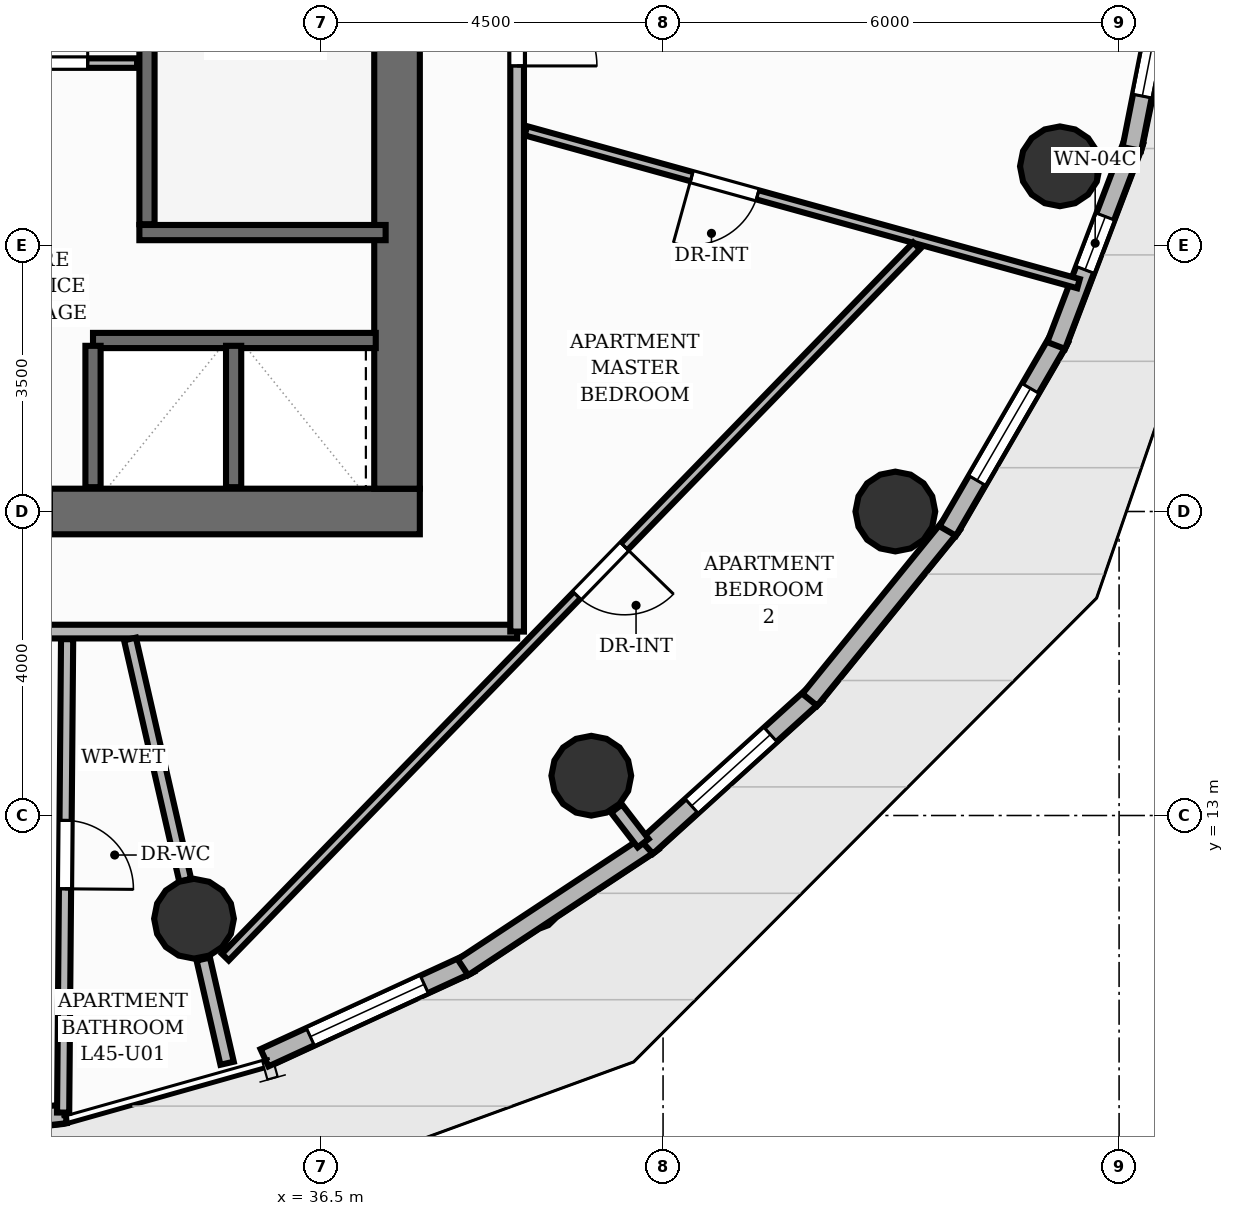
"""IFC4 building model, lengths in metres.
Left out: names, types, materials, properties, quantities, classifications, styles, units other than length and angle.
Written with IfcOpenShell. Run it as: python <this file> out.ifc"""

import sys

from ifc_helpers import new_model, si_unit, direction, frame, frame_2d, origin, origin_2d, place, context, subcontext, project, spatial, rectangle, circle, extrude, element, fill, save


model = new_model("IFC4")
c1 = context("Model", 3, precision=1e-05, world=origin(), true_north=direction((0.0, 1.0)))
c2 = subcontext(c1, "Body", "Model", "MODEL_VIEW")
j1 = project(units=[si_unit("LENGTHUNIT", "METRE"), si_unit("PLANEANGLEUNIT", "RADIAN")], contexts=[c1])
p1 = place(None, origin())
s1 = spatial("IfcSite", under=j1, at=p1, CompositionType="ELEMENT")
p2 = place(p1, origin())
s2 = spatial("IfcBuilding", under=s1, at=p2, CompositionType="ELEMENT")
p3 = place(p2, frame((0.0, 0.0, 152.16)))
s3 = spatial("IfcBuildingStorey", under=s2, at=p3, CompositionType="ELEMENT", Elevation=152.16)
p4 = place(p3, frame((22.7, 17.0, 0.0), z_axis=(0.0, 0.0, 1.0), x_axis=(1.0, 0.0, 0.0)))
e1 = element("IfcWall", 1, at=p4, inside=s3, PredefinedType="SHEAR", context=c2, shape_type="SweptSolid", body=[
    extrude(rectangle(XDim=15.1, YDim=0.6, at=frame_2d((7.55, 0.0))), origin(), (0.0, 0.0, 1.0), 3.2),
])
p5 = place(p4, frame((5.8, 0.0, 0.0)))
e2 = element("IfcOpeningElement", 2, at=p5, cuts=e1, PredefinedType="OPENING", context=c2, shape_type="SweptSolid", body=[
    extrude(rectangle(XDim=1.1, YDim=2.15, at=frame_2d((0.55, 1.075))), frame((0.0, 0.31, 0.0), z_axis=(0.0, -1.0, 0.0), x_axis=(1.0, 0.0, 0.0)), (0.0, 0.0, 1.0), 0.62),
])
p6 = place(p4, frame((9.35, 0.0, 0.0)))
e3 = element("IfcOpeningElement", 3, at=p6, cuts=e1, PredefinedType="OPENING", context=c2, shape_type="SweptSolid", body=[
    extrude(rectangle(XDim=0.9, YDim=2.1, at=frame_2d((0.45, 1.05))), frame((0.0, 0.31, 0.0), z_axis=(0.0, -1.0, 0.0), x_axis=(1.0, 0.0, 0.0)), (0.0, 0.0, 1.0), 0.62),
])
p7 = place(p3, frame((37.5, 17.3, 0.0), z_axis=(0.0, 0.0, 1.0), x_axis=(0.0, 1.0, 0.0)))
e4 = element("IfcWall", 4, at=p7, inside=s3, PredefinedType="SHEAR", context=c2, shape_type="SweptSolid", body=[
    extrude(rectangle(XDim=13.4, YDim=0.6, at=frame_2d((6.7, 0.0))), origin(), (0.0, 0.0, 1.0), 3.2),
])
for number, where, z_axis, x_axis in (
    (5, (34.829, 11.642, 0.0), (0.0, 0.0, 1.0), (1.0, 0.0, 0.0)),
    (6, (40.056, 13.523, 0.0), (0.0, 0.0, 1.0), (1.0, 0.0, 0.0)),
    (7, (44.056, 17.0, 0.0), (0.0, 0.0, 1.0), (1.0, 0.0, 0.0)),
    (8, (46.221, 21.542, 0.0), (0.0, 0.0, 1.0), (1.0, 0.0, 0.0)),
):
    element("IfcColumn", number, at=place(p3, frame(where, z_axis=z_axis, x_axis=x_axis)), inside=s3, PredefinedType="COLUMN", context=c2, shape_type="SweptSolid", body=[
        extrude(circle(Radius=0.525, at=origin_2d()), origin(), (0.0, 0.0, 1.0), 3.2),
    ])
p8 = place(p3, frame((33.14, 9.076, 0.0), z_axis=(0.0, 0.0, 1.0), x_axis=(-0.993631150985, -0.112681568111, 0.0)))
e9 = element("IfcWall", 9, at=p8, inside=s3, PredefinedType="SOLIDWALL", context=c2, shape_type="SweptSolid", body=[
    extrude(rectangle(XDim=2.882, YDim=0.25, at=frame_2d((1.441, 0.0))), origin(), (0.0, 0.0, 1.0), 2.96),
])
p9 = place(p8, frame((0.866, 0.0, 0.0)))
e10 = element("IfcOpeningElement", 10, at=p9, cuts=e9, PredefinedType="OPENING", context=c2, shape_type="SweptSolid", body=[
    extrude(rectangle(XDim=1.15, YDim=2.2, at=frame_2d((0.575, 1.1))), frame((0.0, 0.135, 0.0), z_axis=(0.0, -1.0, 0.0), x_axis=(1.0, 0.0, 0.0)), (0.0, 0.0, 1.0), 0.27),
])
p10 = place(p3, frame((38.461, 11.056, 0.0), z_axis=(0.0, 0.0, 1.0), x_axis=(-0.908594420046, -0.417679518124, 0.0)))
e11 = element("IfcWall", 11, at=p10, inside=s3, PredefinedType="SOLIDWALL", context=c2, shape_type="SweptSolid", body=[
    extrude(rectangle(XDim=2.977, YDim=0.25, at=frame_2d((1.489, 0.0))), origin(), (0.0, 0.0, 1.0), 2.96),
])
p11 = place(p10, frame((0.664, 0.0, 0.85)))
e12 = element("IfcOpeningElement", 12, at=p11, cuts=e11, PredefinedType="OPENING", context=c2, shape_type="SweptSolid", body=[
    extrude(rectangle(XDim=1.65, YDim=1.55, at=frame_2d((0.825, 0.775))), frame((0.0, 0.135, 0.0), z_axis=(0.0, -1.0, 0.0), x_axis=(1.0, 0.0, 0.0)), (0.0, 0.0, 1.0), 0.27),
])
p12 = place(p3, frame((40.868, 12.656, 0.0), z_axis=(0.0, 0.0, 1.0), x_axis=(-0.83436073477, -0.551218798912, 0.0)))
e13 = element("IfcWall", 13, at=p12, inside=s3, PredefinedType="SOLIDWALL", context=c2, shape_type="SweptSolid", body=[
    extrude(rectangle(XDim=2.998, YDim=0.25, at=frame_2d((1.499, 0.0))), origin(), (0.0, 0.0, 1.0), 2.96),
])
p13 = place(p3, frame((43.005, 14.602, 0.0), z_axis=(0.0, 0.0, 1.0), x_axis=(-0.741367932595, -0.671098791922, 0.0)))
e14 = element("IfcWall", 14, at=p13, inside=s3, PredefinedType="SOLIDWALL", context=c2, shape_type="SweptSolid", body=[
    extrude(rectangle(XDim=2.998, YDim=0.25, at=frame_2d((1.499, 0.0))), origin(), (0.0, 0.0, 1.0), 2.96),
])
p14 = place(p13, frame((0.799, 0.0, 0.85)))
e15 = element("IfcOpeningElement", 15, at=p14, cuts=e14, PredefinedType="OPENING", context=c2, shape_type="SweptSolid", body=[
    extrude(rectangle(XDim=1.4, YDim=1.55, at=frame_2d((0.7, 0.775))), frame((0.0, 0.135, 0.0), z_axis=(0.0, -1.0, 0.0), x_axis=(1.0, 0.0, 0.0)), (0.0, 0.0, 1.0), 0.27),
])
p15 = place(p3, frame((44.807, 16.833, 0.0), z_axis=(0.0, 0.0, 1.0), x_axis=(-0.630478385784, -0.776206805599, 0.0)))
e16 = element("IfcWall", 16, at=p15, inside=s3, PredefinedType="SOLIDWALL", context=c2, shape_type="SweptSolid", body=[
    extrude(rectangle(XDim=2.977, YDim=0.25, at=frame_2d((1.489, 0.0))), origin(), (0.0, 0.0, 1.0), 2.96),
])
p16 = place(p3, frame((46.219, 19.283, 0.0), z_axis=(0.0, 0.0, 1.0), x_axis=(-0.502009170613, -0.864862296912, 0.0)))
e17 = element("IfcWall", 17, at=p16, inside=s3, PredefinedType="SOLIDWALL", context=c2, shape_type="SweptSolid", body=[
    extrude(rectangle(XDim=2.937, YDim=0.25, at=frame_2d((1.469, 0.0))), origin(), (0.0, 0.0, 1.0), 2.96),
])
p17 = place(p16, frame((0.768, 0.0, 0.85)))
e18 = element("IfcOpeningElement", 18, at=p17, cuts=e17, PredefinedType="OPENING", context=c2, shape_type="SweptSolid", body=[
    extrude(rectangle(XDim=1.4, YDim=1.55, at=frame_2d((0.7, 0.775))), frame((0.0, 0.135, 0.0), z_axis=(0.0, -1.0, 0.0), x_axis=(1.0, 0.0, 0.0)), (0.0, 0.0, 1.0), 0.27),
])
p18 = place(p3, frame((47.198, 21.877, 0.0), z_axis=(0.0, 0.0, 1.0), x_axis=(-0.356178525313, -0.934417924756, 0.0)))
e19 = element("IfcWall", 19, at=p18, inside=s3, PredefinedType="SOLIDWALL", context=c2, shape_type="SweptSolid", body=[
    extrude(rectangle(XDim=2.882, YDim=0.25, at=frame_2d((1.441, 0.0))), origin(), (0.0, 0.0, 1.0), 2.96),
])
p19 = place(p18, frame((1.066, 0.0, 0.85)))
e20 = element("IfcOpeningElement", 20, at=p19, cuts=e19, PredefinedType="OPENING", context=c2, shape_type="SweptSolid", body=[
    extrude(rectangle(XDim=0.75, YDim=1.55, at=frame_2d((0.375, 0.775))), frame((0.0, 0.135, 0.0), z_axis=(0.0, -1.0, 0.0), x_axis=(1.0, 0.0, 0.0)), (0.0, 0.0, 1.0), 0.27),
])
p20 = place(p3, frame((47.715, 24.534, 0.0), z_axis=(0.0, 0.0, 1.0), x_axis=(-0.194099406303, -0.980981865517, 0.0)))
e21 = element("IfcWall", 21, at=p20, inside=s3, PredefinedType="SOLIDWALL", context=c2, shape_type="SweptSolid", body=[
    extrude(rectangle(XDim=2.817, YDim=0.25, at=frame_2d((1.409, 0.0))), origin(), (0.0, 0.0, 1.0), 2.96),
])
p21 = place(p20, frame((0.709, 0.0, 0.85)))
e22 = element("IfcOpeningElement", 22, at=p21, cuts=e21, PredefinedType="OPENING", context=c2, shape_type="SweptSolid", body=[
    extrude(rectangle(XDim=1.4, YDim=1.55, at=frame_2d((0.7, 0.775))), frame((0.0, 0.135, 0.0), z_axis=(0.0, -1.0, 0.0), x_axis=(1.0, 0.0, 0.0)), (0.0, 0.0, 1.0), 0.27),
])
p22 = place(p3, frame((34.21, 20.78, 0.0), z_axis=(0.0, 0.0, 1.0), x_axis=(0.0, 1.0, 0.0)))
e23 = element("IfcWall", 23, at=p22, inside=s3, PredefinedType="SHEAR", context=c2, shape_type="SweptSolid", body=[
    extrude(rectangle(XDim=6.44, YDim=0.2, at=frame_2d((3.22, 0.0))), origin(), (0.0, 0.0, 1.0), 3.2),
])
p23 = place(p3, frame((34.11, 20.67, 0.0), z_axis=(0.0, 0.0, 1.0), x_axis=(1.0, 0.0, 0.0)))
e24 = element("IfcWall", 24, at=p23, inside=s3, PredefinedType="SHEAR", context=c2, shape_type="SweptSolid", body=[
    extrude(rectangle(XDim=3.24, YDim=0.2, at=frame_2d((1.62, 0.0))), origin(), (0.0, 0.0, 1.0), 3.2),
])
p24 = place(p3, frame((33.5, 19.25, 0.0), z_axis=(0.0, 0.0, 1.0), x_axis=(1.0, 0.0, 0.0)))
e25 = element("IfcWall", 25, at=p24, inside=s3, PredefinedType="SHEAR", context=c2, shape_type="SweptSolid", body=[
    extrude(rectangle(XDim=3.72, YDim=0.2, at=frame_2d((1.86, 0.0))), origin(), (0.0, 0.0, 1.0), 3.2),
])
for number, where, z_axis, x_axis in (
    (26, (33.5, 17.32, 0.0), (0.0, 0.0, 1.0), (0.0, 1.0, 0.0)),
    (27, (35.35, 17.32, 0.0), (0.0, 0.0, 1.0), (0.0, 1.0, 0.0)),
):
    element("IfcWall", number, at=place(p3, frame(where, z_axis=z_axis, x_axis=x_axis)), inside=s3, PredefinedType="SHEAR", context=c2, shape_type="SweptSolid", body=[
        extrude(rectangle(XDim=1.86, YDim=0.2, at=frame_2d((0.93, 0.0))), origin(), (0.0, 0.0, 1.0), 3.2),
    ])
p25 = place(p3, frame((32.22, 22.9, 0.0), z_axis=(0.0, 0.0, 1.0), x_axis=(1.0, 0.0, 0.0)))
e28 = element("IfcWall", 28, at=p25, inside=s3, PredefinedType="PARTITIONING", context=c2, shape_type="SweptSolid", body=[
    extrude(rectangle(XDim=1.86, YDim=0.125, at=frame_2d((0.93, 0.0))), origin(), (0.0, 0.0, 1.0), 2.955),
])
p26 = place(p25, frame((0.31, 0.0, 0.0)))
e29 = element("IfcOpeningElement", 29, at=p26, cuts=e28, PredefinedType="OPENING", context=c2, shape_type="SweptSolid", body=[
    extrude(rectangle(XDim=0.9, YDim=2.1, at=frame_2d((0.45, 1.05))), frame((0.0, 0.073, 0.0), z_axis=(0.0, -1.0, 0.0), x_axis=(1.0, 0.0, 0.0)), (0.0, 0.0, 1.0), 0.145),
])
p27 = place(p3, frame((34.95, 11.111, 0.0), z_axis=(0.0, 0.0, 1.0), x_axis=(0.223121817242, -0.974790569646, 0.0)))
e30 = element("IfcWall", 30, at=p27, inside=s3, PredefinedType="PARTITIONING", context=c2, shape_type="SweptSolid", body=[
    extrude(rectangle(XDim=1.406, YDim=0.18, at=frame_2d((0.703, 0.0))), origin(), (0.0, 0.0, 1.0), 2.336),
])
p28 = place(p3, frame((40.388, 13.092, 0.0), z_axis=(0.0, 0.0, 1.0), x_axis=(0.609608105511, -0.79270294417, 0.0)))
e31 = element("IfcWall", 31, at=p28, inside=s3, PredefinedType="PARTITIONING", context=c2, shape_type="SweptSolid", body=[
    extrude(rectangle(XDim=0.575, YDim=0.18, at=frame_2d((0.287, 0.0))), origin(), (0.0, 0.0, 1.0), 2.336),
])
p29 = place(p3, frame((39.08, 15.42, 0.0), z_axis=(0.0, 0.0, 1.0), x_axis=(-1.0, 0.0, 0.0)))
e32 = element("IfcWall", 32, at=p29, inside=s3, PredefinedType="PARTITIONING", context=c2, shape_type="SweptSolid", body=[
    extrude(rectangle(XDim=16.531, YDim=0.18, at=frame_2d((8.266, 0.0))), origin(), (0.0, 0.0, 1.0), 2.955),
])
p30 = place(p29, frame((6.994, 0.0, 0.0)))
e33 = element("IfcOpeningElement", 33, at=p30, cuts=e32, PredefinedType="OPENING", context=c2, shape_type="SweptSolid", body=[
    extrude(rectangle(XDim=1.05, YDim=2.15, at=frame_2d((0.525, 1.075))), frame((0.0, 0.1, 0.0), z_axis=(0.0, -1.0, 0.0), x_axis=(1.0, 0.0, 0.0)), (0.0, 0.0, 1.0), 0.2),
])
p31 = place(p3, frame((39.08, 32.58, 0.0), z_axis=(0.0, 0.0, 1.0), x_axis=(0.0, -1.0, 0.0)))
e34 = element("IfcWall", 34, at=p31, inside=s3, PredefinedType="PARTITIONING", context=c2, shape_type="SweptSolid", body=[
    extrude(rectangle(XDim=17.16, YDim=0.18, at=frame_2d((8.58, 0.0))), origin(), (0.0, 0.0, 1.0), 2.955),
])
p32 = place(p31, frame((8.667, 0.0, 0.0)))
e35 = element("IfcOpeningElement", 35, at=p32, cuts=e34, PredefinedType="OPENING", context=c2, shape_type="SweptSolid", body=[
    extrude(rectangle(XDim=1.05, YDim=2.15, at=frame_2d((0.525, 1.075))), frame((0.0, 0.1, 0.0), z_axis=(0.0, -1.0, 0.0), x_axis=(1.0, 0.0, 0.0)), (0.0, 0.0, 1.0), 0.2),
])
p33 = place(p31, frame((2.284, 0.0, 0.0)))
e36 = element("IfcOpeningElement", 36, at=p33, cuts=e34, PredefinedType="OPENING", context=c2, shape_type="SweptSolid", body=[
    extrude(rectangle(XDim=0.9, YDim=2.1, at=frame_2d((0.45, 1.05))), frame((0.0, 0.1, 0.0), z_axis=(0.0, -1.0, 0.0), x_axis=(1.0, 0.0, 0.0)), (0.0, 0.0, 1.0), 0.2),
])
p34 = place(p3, frame((33.159, 15.32, 0.0), z_axis=(0.0, 0.0, 1.0), x_axis=(-0.008387256911, -0.999964826342, 0.0)))
e37 = element("IfcWall", 37, at=p34, inside=s3, PredefinedType="PLUMBINGWALL", context=c2, shape_type="SweptSolid", body=[
    extrude(rectangle(XDim=6.229, YDim=0.16, at=frame_2d((3.115, 0.0))), origin(), (0.0, 0.0, 1.0), 2.955),
])
p35 = place(p34, frame((2.385, 0.0, 0.0)))
e38 = element("IfcOpeningElement", 38, at=p35, cuts=e37, PredefinedType="OPENING", context=c2, shape_type="SweptSolid", body=[
    extrude(rectangle(XDim=0.9, YDim=2.1, at=frame_2d((0.45, 1.05))), frame((0.0, 0.09, 0.0), z_axis=(0.0, -1.0, 0.0), x_axis=(1.0, 0.0, 0.0)), (0.0, 0.0, 1.0), 0.18),
])
p36 = place(p3, frame((33.986, 15.323, 0.0), z_axis=(0.0, 0.0, 1.0), x_axis=(0.223166862669, -0.97478025801, 0.0)))
e39 = element("IfcWall", 39, at=p36, inside=s3, PredefinedType="PLUMBINGWALL", context=c2, shape_type="SweptSolid", body=[
    extrude(rectangle(XDim=3.256, YDim=0.16, at=frame_2d((1.628, 0.0))), origin(), (0.0, 0.0, 1.0), 2.336),
])
p37 = place(p3, frame((46.466, 19.998, 0.0), z_axis=(0.0, 0.0, 1.0), x_axis=(-0.963794664313, 0.26664554195, 0.0)))
e40 = element("IfcWall", 40, at=p37, inside=s3, PredefinedType="PARTITIONING", context=c2, shape_type="SweptSolid", body=[
    extrude(rectangle(XDim=7.544, YDim=0.125, at=frame_2d((3.772, 0.0))), origin(), (0.0, 0.0, 1.0), 2.692),
])
p38 = place(p37, frame((4.381, 0.0, 0.0)))
e41 = element("IfcOpeningElement", 41, at=p38, cuts=e40, PredefinedType="OPENING", context=c2, shape_type="SweptSolid", body=[
    extrude(rectangle(XDim=0.9, YDim=2.1, at=frame_2d((0.45, 1.05))), frame((0.0, 0.073, 0.0), z_axis=(0.0, -1.0, 0.0), x_axis=(1.0, 0.0, 0.0)), (0.0, 0.0, 1.0), 0.145),
])
p39 = place(p3, frame((44.336, 20.497, 0.0), z_axis=(0.0, 0.0, 1.0), x_axis=(-0.696857448942, -0.717209659621, 0.0)))
e42 = element("IfcWall", 42, at=p39, inside=s3, PredefinedType="PARTITIONING", context=c2, shape_type="SweptSolid", body=[
    extrude(rectangle(XDim=13.052, YDim=0.125, at=frame_2d((6.526, 0.0))), origin(), (0.0, 0.0, 1.0), 2.411),
])
p40 = place(p39, frame((5.516, 0.0, 0.0)))
e43 = element("IfcOpeningElement", 43, at=p40, cuts=e42, PredefinedType="OPENING", context=c2, shape_type="SweptSolid", body=[
    extrude(rectangle(XDim=0.9, YDim=2.1, at=frame_2d((0.45, 1.05))), frame((0.0, 0.073, 0.0), z_axis=(0.0, -1.0, 0.0), x_axis=(1.0, 0.0, 0.0)), (0.0, 0.0, 1.0), 0.145),
])
p41 = place(p11, origin())
e44 = element("IfcWindow", 44, at=p41, inside=s3, PartitioningType="SINGLE_PANEL", PredefinedType="WINDOW", context=c2, shape_type="SweptSolid", body=[
    extrude(rectangle(XDim=1.65, YDim=1.55, at=frame_2d((0.825, 0.775))), frame((0.0, 0.03, 0.0), z_axis=(0.0, -1.0, 0.0), x_axis=(1.0, 0.0, 0.0)), (0.0, 0.0, 1.0), 0.06),
])
fill(e12, e44)
p42 = place(p14, origin())
e45 = element("IfcWindow", 45, at=p42, inside=s3, PartitioningType="SINGLE_PANEL", PredefinedType="WINDOW", context=c2, shape_type="SweptSolid", body=[
    extrude(rectangle(XDim=1.4, YDim=1.55, at=frame_2d((0.7, 0.775))), frame((0.0, 0.03, 0.0), z_axis=(0.0, -1.0, 0.0), x_axis=(1.0, 0.0, 0.0)), (0.0, 0.0, 1.0), 0.06),
])
fill(e15, e45)
p43 = place(p17, origin())
e46 = element("IfcWindow", 46, at=p43, inside=s3, PartitioningType="SINGLE_PANEL", PredefinedType="WINDOW", context=c2, shape_type="SweptSolid", body=[
    extrude(rectangle(XDim=1.4, YDim=1.55, at=frame_2d((0.7, 0.775))), frame((0.0, 0.03, 0.0), z_axis=(0.0, -1.0, 0.0), x_axis=(1.0, 0.0, 0.0)), (0.0, 0.0, 1.0), 0.06),
])
fill(e18, e46)
p44 = place(p19, origin())
e47 = element("IfcWindow", 47, at=p44, inside=s3, PartitioningType="SINGLE_PANEL", PredefinedType="WINDOW", context=c2, shape_type="SweptSolid", body=[
    extrude(rectangle(XDim=0.75, YDim=1.55, at=frame_2d((0.375, 0.775))), frame((0.0, 0.03, 0.0), z_axis=(0.0, -1.0, 0.0), x_axis=(1.0, 0.0, 0.0)), (0.0, 0.0, 1.0), 0.06),
])
fill(e20, e47)
p45 = place(p21, origin())
e48 = element("IfcWindow", 48, at=p45, inside=s3, PartitioningType="SINGLE_PANEL", PredefinedType="WINDOW", context=c2, shape_type="SweptSolid", body=[
    extrude(rectangle(XDim=1.4, YDim=1.55, at=frame_2d((0.7, 0.775))), frame((0.0, 0.03, 0.0), z_axis=(0.0, -1.0, 0.0), x_axis=(1.0, 0.0, 0.0)), (0.0, 0.0, 1.0), 0.06),
])
fill(e22, e48)
p46 = place(p26, origin())
e49 = element("IfcDoor", 49, at=p46, inside=s3, OperationType="SINGLE_SWING_RIGHT", PredefinedType="DOOR", context=c2, shape_type="SweptSolid", body=[
    extrude(rectangle(XDim=0.9, YDim=2.1, at=frame_2d((0.45, 1.05))), frame((0.0, 0.025, 0.0), z_axis=(0.0, -1.0, 0.0), x_axis=(1.0, 0.0, 0.0)), (0.0, 0.0, 1.0), 0.05),
])
fill(e29, e49)
p47 = place(p35, origin())
e50 = element("IfcDoor", 50, at=p47, inside=s3, OperationType="SINGLE_SWING_RIGHT", PredefinedType="DOOR", context=c2, shape_type="SweptSolid", body=[
    extrude(rectangle(XDim=0.9, YDim=2.1, at=frame_2d((0.45, 1.05))), frame((0.0, 0.025, 0.0), z_axis=(0.0, -1.0, 0.0), x_axis=(1.0, 0.0, 0.0)), (0.0, 0.0, 1.0), 0.05),
])
fill(e38, e50)
p48 = place(p32, origin())
e51 = element("IfcDoor", 51, at=p48, inside=s3, OperationType="SINGLE_SWING_RIGHT", PredefinedType="DOOR", context=c2, shape_type="SweptSolid", body=[
    extrude(rectangle(XDim=1.05, YDim=2.15, at=frame_2d((0.525, 1.075))), frame((0.0, 0.025, 0.0), z_axis=(0.0, -1.0, 0.0), x_axis=(1.0, 0.0, 0.0)), (0.0, 0.0, 1.0), 0.05),
])
fill(e35, e51)
p49 = place(p38, origin())
e52 = element("IfcDoor", 52, at=p49, inside=s3, OperationType="SINGLE_SWING_RIGHT", PredefinedType="DOOR", context=c2, shape_type="SweptSolid", body=[
    extrude(rectangle(XDim=0.9, YDim=2.1, at=frame_2d((0.45, 1.05))), frame((0.0, 0.025, 0.0), z_axis=(0.0, -1.0, 0.0), x_axis=(1.0, 0.0, 0.0)), (0.0, 0.0, 1.0), 0.05),
])
fill(e41, e52)
p50 = place(p40, origin())
e53 = element("IfcDoor", 53, at=p50, inside=s3, OperationType="SINGLE_SWING_LEFT", PredefinedType="DOOR", context=c2, shape_type="SweptSolid", body=[
    extrude(rectangle(XDim=0.9, YDim=2.1, at=frame_2d((0.45, 1.05))), frame((0.0, 0.025, 0.0), z_axis=(0.0, -1.0, 0.0), x_axis=(1.0, 0.0, 0.0)), (0.0, 0.0, 1.0), 0.05),
])
fill(e43, e53)
save(model, sys.argv[1])
